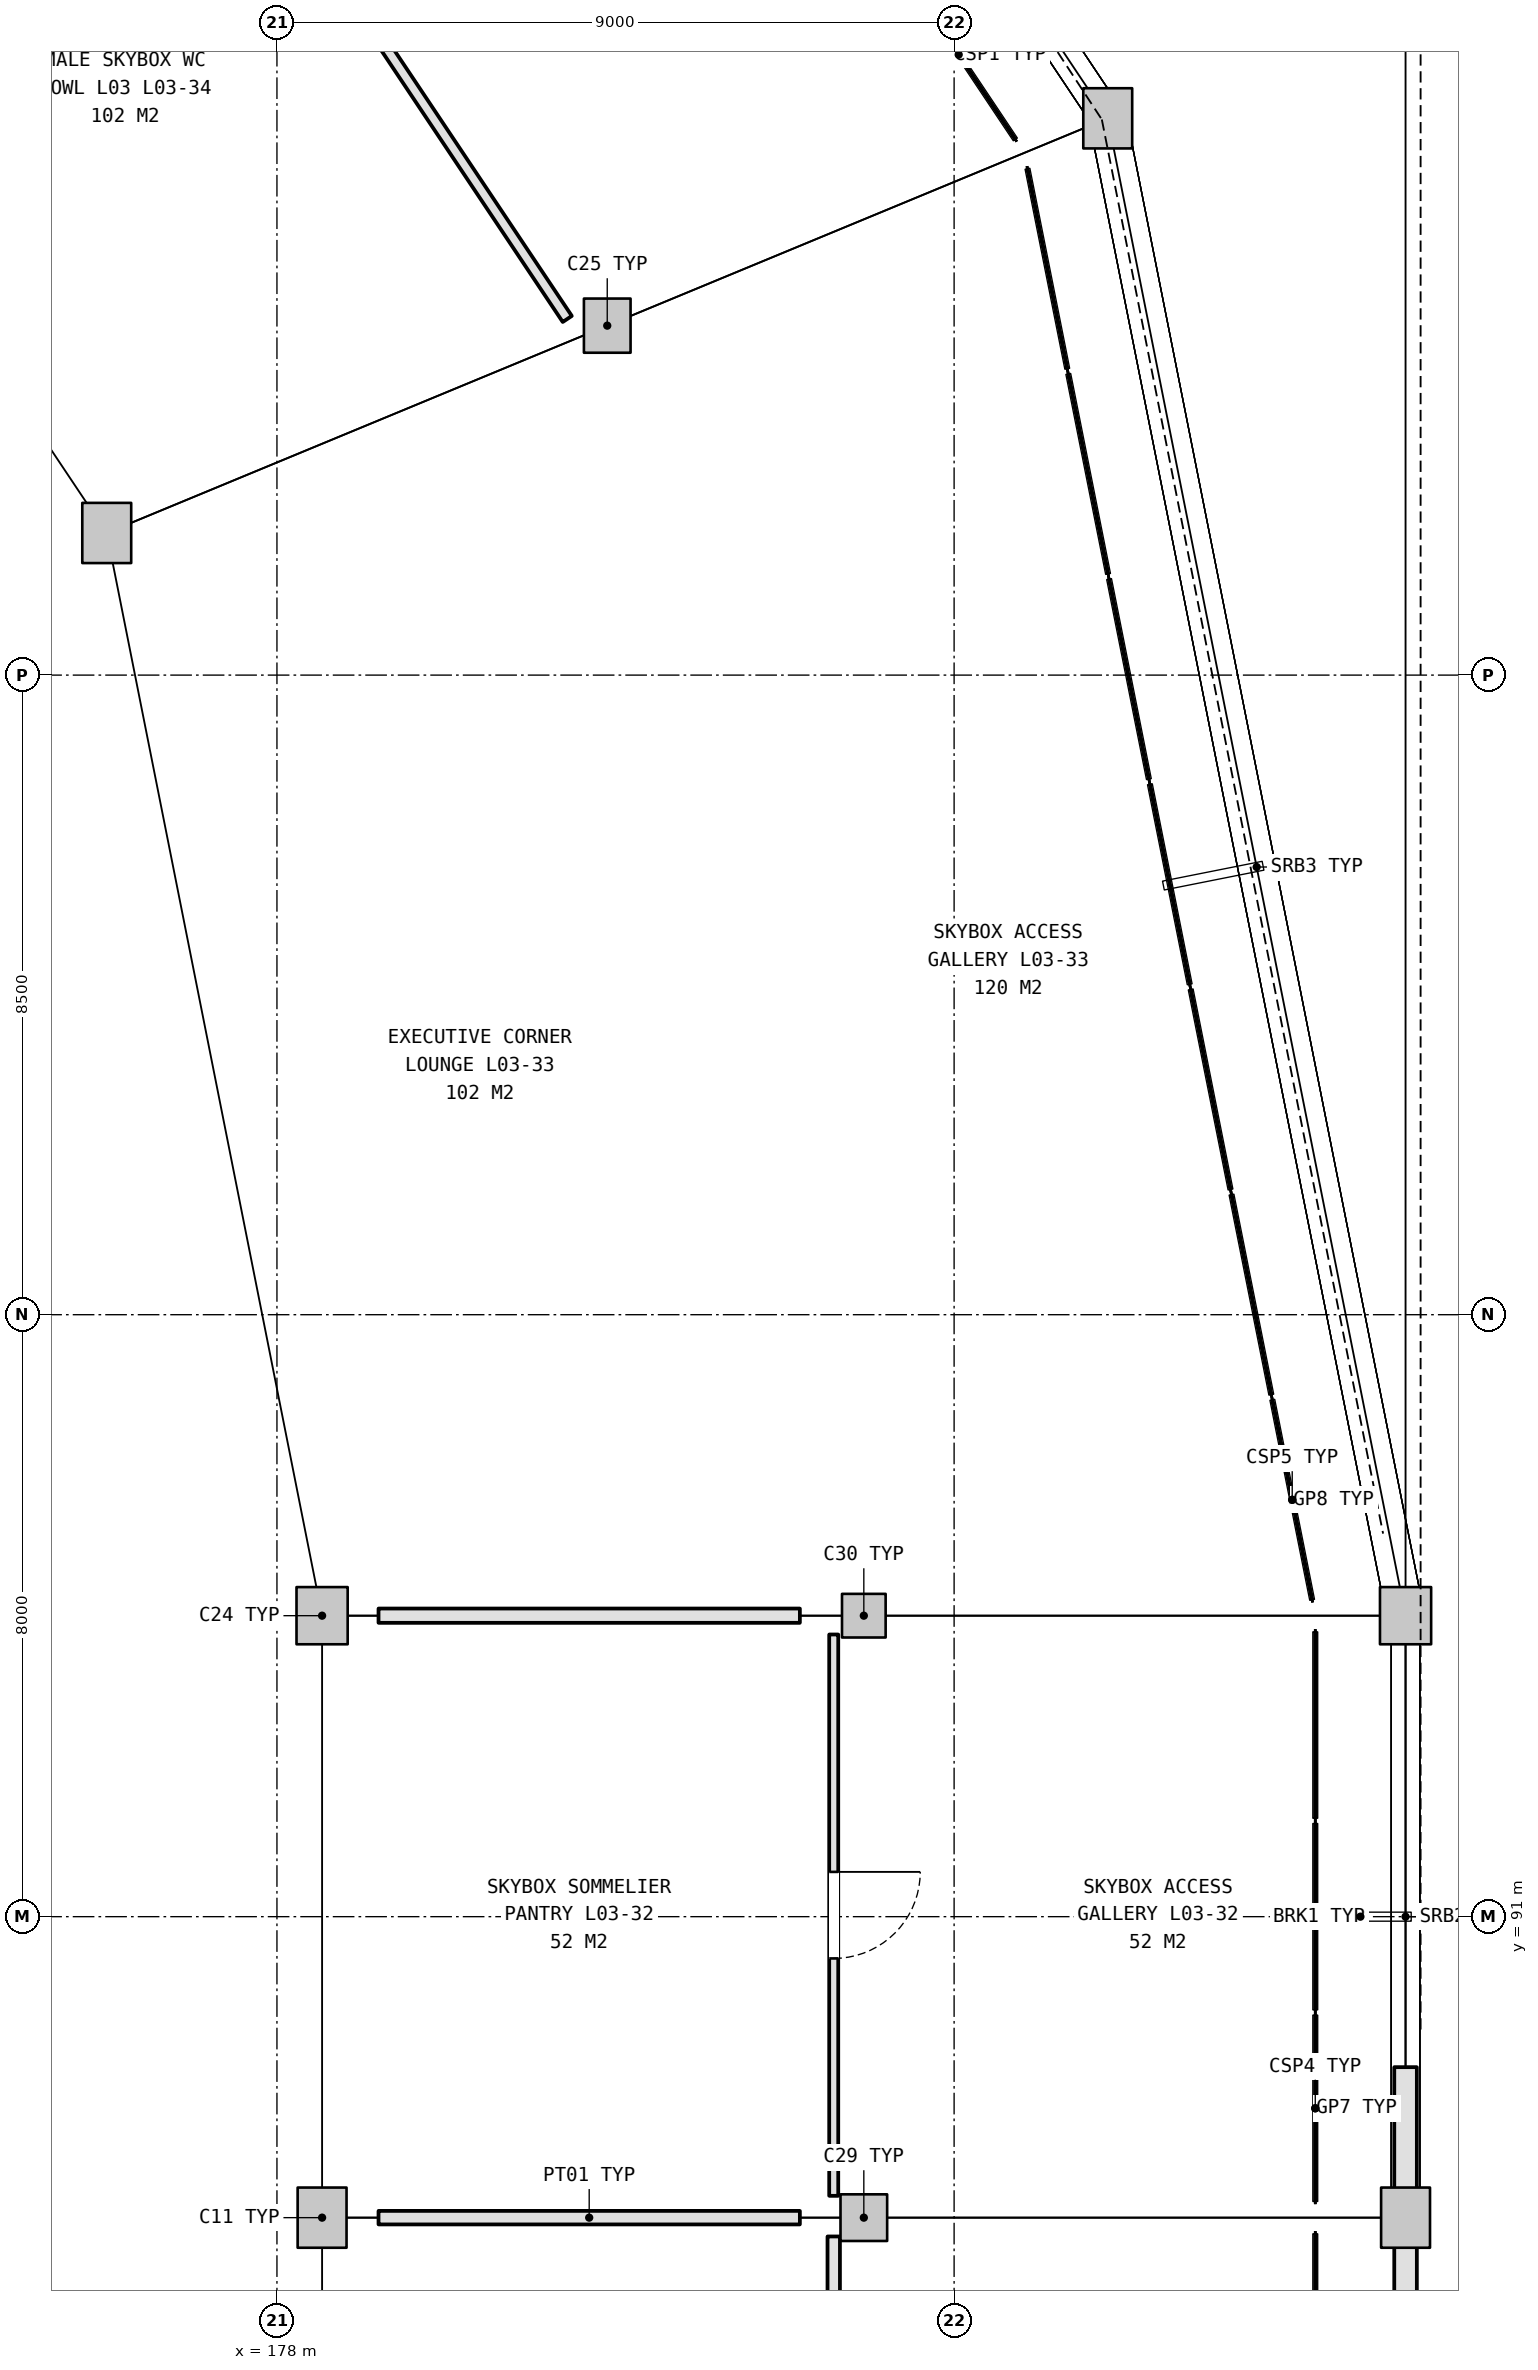
"""IFC4 building model, lengths in metres.
Left out: names, types, materials, properties, quantities, classifications, styles, units other than length and angle.
Written with IfcOpenShell. Run it as: python <this file> out.ifc"""

import sys

from ifc_helpers import new_model, si_unit, direction, frame, frame_2d, origin, origin_2d, place, context, subcontext, project, spatial, rectangle, extrude, element, fill, save


model = new_model("IFC4")
c1 = context("Model", 3, precision=1e-05, world=origin(), true_north=direction((0.0, 1.0)))
c2 = subcontext(c1, "Body", "Model", "MODEL_VIEW")
j1 = project(units=[si_unit("LENGTHUNIT", "METRE"), si_unit("PLANEANGLEUNIT", "RADIAN")], contexts=[c1])
p1 = place(None, origin())
s1 = spatial("IfcSite", under=j1, at=p1, CompositionType="ELEMENT")
p2 = place(p1, origin())
s2 = spatial("IfcBuilding", under=s1, at=p2, CompositionType="ELEMENT")
p3 = place(p2, frame((0.0, 0.0, 16.2)))
s3 = spatial("IfcBuildingStorey", under=s2, at=p3, CompositionType="ELEMENT", Elevation=16.2)
p4 = place(p3, frame((178.6, 87.0, 0.0), z_axis=(0.0, 0.0, 1.0), x_axis=(1.0, 0.0, 0.0)))
e1 = element("IfcColumn", 1, at=p4, inside=s3, PredefinedType="COLUMN", context=c2, shape_type="SweptSolid", body=[
    extrude(rectangle(XDim=0.65, YDim=0.8, at=origin_2d()), origin(), (0.0, 0.0, 1.0), 5.4),
])
p5 = place(p3, frame((185.8, 87.0, 0.0), z_axis=(0.0, 0.0, 1.0), x_axis=(1.0, 0.0, 0.0)))
e2 = element("IfcColumn", 2, at=p5, inside=s3, PredefinedType="COLUMN", context=c2, shape_type="SweptSolid", body=[
    extrude(rectangle(XDim=0.62, YDim=0.62, at=origin_2d()), origin(), (0.0, 0.0, 1.0), 5.4),
])
p6 = place(p3, frame((193.0, 87.0, 0.0), z_axis=(0.0, 0.0, 1.0), x_axis=(1.0, 0.0, 0.0)))
e3 = element("IfcColumn", 3, at=p6, inside=s3, PredefinedType="COLUMN", context=c2, shape_type="SweptSolid", body=[
    extrude(rectangle(XDim=0.65, YDim=0.8, at=origin_2d()), origin(), (0.0, 0.0, 1.0), 5.4),
])
p7 = place(p3, frame((178.6, 95.0, 0.0), z_axis=(0.0, 0.0, 1.0), x_axis=(1.0, 0.0, 0.0)))
e4 = element("IfcColumn", 4, at=p7, inside=s3, PredefinedType="COLUMN", context=c2, shape_type="SweptSolid", body=[
    extrude(rectangle(XDim=0.68, YDim=0.76, at=origin_2d()), origin(), (0.0, 0.0, 1.0), 5.4),
])
p8 = place(p3, frame((185.8, 95.0, 0.0), z_axis=(0.0, 0.0, 1.0), x_axis=(1.0, 0.0, 0.0)))
e5 = element("IfcColumn", 5, at=p8, inside=s3, PredefinedType="COLUMN", context=c2, shape_type="SweptSolid", body=[
    extrude(rectangle(XDim=0.58, YDim=0.58, at=origin_2d()), origin(), (0.0, 0.0, 1.0), 5.4),
])
p9 = place(p3, frame((193.0, 95.0, 0.0), z_axis=(0.0, 0.0, 1.0), x_axis=(1.0, 0.0, 0.0)))
e6 = element("IfcColumn", 6, at=p9, inside=s3, PredefinedType="COLUMN", context=c2, shape_type="SweptSolid", body=[
    extrude(rectangle(XDim=0.68, YDim=0.76, at=origin_2d()), origin(), (0.0, 0.0, 1.0), 5.4),
])
p10 = place(p3, frame((175.738, 109.389, 0.0), z_axis=(0.0, 0.0, 1.0), x_axis=(1.0, 0.0, 0.0)))
e7 = element("IfcColumn", 7, at=p10, inside=s3, PredefinedType="COLUMN", context=c2, shape_type="SweptSolid", body=[
    extrude(rectangle(XDim=0.65, YDim=0.8, at=origin_2d()), origin(), (0.0, 0.0, 1.0), 5.4),
])
p11 = place(p3, frame((182.39, 112.144, 0.0), z_axis=(0.0, 0.0, 1.0), x_axis=(1.0, 0.0, 0.0)))
e8 = element("IfcColumn", 8, at=p11, inside=s3, PredefinedType="COLUMN", context=c2, shape_type="SweptSolid", body=[
    extrude(rectangle(XDim=0.62, YDim=0.72, at=origin_2d()), origin(), (0.0, 0.0, 1.0), 5.4),
])
p12 = place(p3, frame((189.042, 114.9, 0.0), z_axis=(0.0, 0.0, 1.0), x_axis=(1.0, 0.0, 0.0)))
e9 = element("IfcColumn", 9, at=p12, inside=s3, PredefinedType="COLUMN", context=c2, shape_type="SweptSolid", body=[
    extrude(rectangle(XDim=0.65, YDim=0.8, at=origin_2d()), origin(), (0.0, 0.0, 1.0), 5.4),
])
p13 = place(p3, frame((193.0, 77.0, 0.0), z_axis=(0.0, 0.0, 1.0), x_axis=(0.0, 1.0, 0.0)))
e10 = element("IfcWall", 10, at=p13, inside=s3, PredefinedType="SOLIDWALL", context=c2, shape_type="SweptSolid", body=[
    extrude(rectangle(XDim=12.0, YDim=0.3, at=frame_2d((6.0, 0.0))), origin(), (0.0, 0.0, 1.0), 4.205),
])
p14 = place(p13, frame((5.1, 0.0, 0.0)))
e11 = element("IfcOpeningElement", 11, at=p14, cuts=e10, PredefinedType="OPENING", context=c2, shape_type="SweptSolid", body=[
    extrude(rectangle(XDim=1.8, YDim=2.2, at=frame_2d((0.9, 1.1))), frame((0.0, 0.16, 0.0), z_axis=(0.0, -1.0, 0.0), x_axis=(1.0, 0.0, 0.0)), (0.0, 0.0, 1.0), 0.32),
])
p15 = place(p3, frame((185.4, 86.75, 0.0), z_axis=(0.0, 0.0, 1.0), x_axis=(0.0, -1.0, 0.0)))
e12 = element("IfcWall", 12, at=p15, inside=s3, PredefinedType="PARTITIONING", context=c2, shape_type="SweptSolid", body=[
    extrude(rectangle(XDim=7.46, YDim=0.165, at=frame_2d((3.73, 0.0))), origin(), (0.0, 0.0, 1.0), 4.305),
])
p16 = place(p15, frame((3.22, 0.0, 0.0)))
e13 = element("IfcOpeningElement", 13, at=p16, cuts=e12, PredefinedType="OPENING", context=c2, shape_type="SweptSolid", body=[
    extrude(rectangle(XDim=1.02, YDim=2.15, at=frame_2d((0.51, 1.075))), frame((0.0, 0.093, 0.0), z_axis=(0.0, -1.0, 0.0), x_axis=(1.0, 0.0, 0.0)), (0.0, 0.0, 1.0), 0.185),
])
p17 = place(p3, frame((179.35, 87.0, 0.0), z_axis=(0.0, 0.0, 1.0), x_axis=(1.0, 0.0, 0.0)))
e14 = element("IfcWall", 14, at=p17, inside=s3, PredefinedType="PARTITIONING", context=c2, shape_type="SweptSolid", body=[
    extrude(rectangle(XDim=5.6, YDim=0.18, at=frame_2d((2.8, 0.0))), origin(), (0.0, 0.0, 1.0), 4.345),
])
p18 = place(p3, frame((185.4, 94.75, 0.0), z_axis=(0.0, 0.0, 1.0), x_axis=(0.0, -1.0, 0.0)))
e15 = element("IfcWall", 15, at=p18, inside=s3, PredefinedType="PARTITIONING", context=c2, shape_type="SweptSolid", body=[
    extrude(rectangle(XDim=7.46, YDim=0.12, at=frame_2d((3.73, 0.0))), origin(), (0.0, 0.0, 1.0), 4.345),
])
p19 = place(p18, frame((3.155, 0.0, 0.0)))
e16 = element("IfcOpeningElement", 16, at=p19, cuts=e15, PredefinedType="OPENING", context=c2, shape_type="SweptSolid", body=[
    extrude(rectangle(XDim=1.15, YDim=2.2, at=frame_2d((0.575, 1.1))), frame((0.0, 0.07, 0.0), z_axis=(0.0, -1.0, 0.0), x_axis=(1.0, 0.0, 0.0)), (0.0, 0.0, 1.0), 0.14),
])
p20 = place(p3, frame((179.35, 95.0, 0.0), z_axis=(0.0, 0.0, 1.0), x_axis=(1.0, 0.0, 0.0)))
e17 = element("IfcWall", 17, at=p20, inside=s3, PredefinedType="PARTITIONING", context=c2, shape_type="SweptSolid", body=[
    extrude(rectangle(XDim=5.6, YDim=0.19, at=frame_2d((2.8, 0.0))), origin(), (0.0, 0.0, 1.0), 4.375),
])
p21 = place(p3, frame((172.534, 126.188, 0.0), z_axis=(0.0, 0.0, 1.0), x_axis=(0.555572701103, -0.831467963177, 0.0)))
e18 = element("IfcWall", 18, at=p21, inside=s3, PredefinedType="PARTITIONING", context=c2, shape_type="SweptSolid", body=[
    extrude(rectangle(XDim=16.783, YDim=0.145, at=frame_2d((8.392, 0.0))), origin(), (0.0, 0.0, 1.0), 4.365),
])
p22 = place(p21, frame((7.842, 0.0, 0.0)))
e19 = element("IfcOpeningElement", 19, at=p22, cuts=e18, PredefinedType="OPENING", context=c2, shape_type="SweptSolid", body=[
    extrude(rectangle(XDim=1.1, YDim=2.15, at=frame_2d((0.55, 1.075))), frame((0.0, 0.083, 0.0), z_axis=(0.0, -1.0, 0.0), x_axis=(1.0, 0.0, 0.0)), (0.0, 0.0, 1.0), 0.165),
])
p23 = place(p19, origin())
e20 = element("IfcDoor", 20, at=p23, inside=s3, OperationType="SINGLE_SWING_LEFT", PredefinedType="DOOR", context=c2, shape_type="SweptSolid", body=[
    extrude(rectangle(XDim=1.15, YDim=2.2, at=frame_2d((0.575, 1.1))), frame((0.0, 0.025, 0.0), z_axis=(0.0, -1.0, 0.0), x_axis=(1.0, 0.0, 0.0)), (0.0, 0.0, 1.0), 0.05),
])
fill(e16, e20)
save(model, sys.argv[1])
